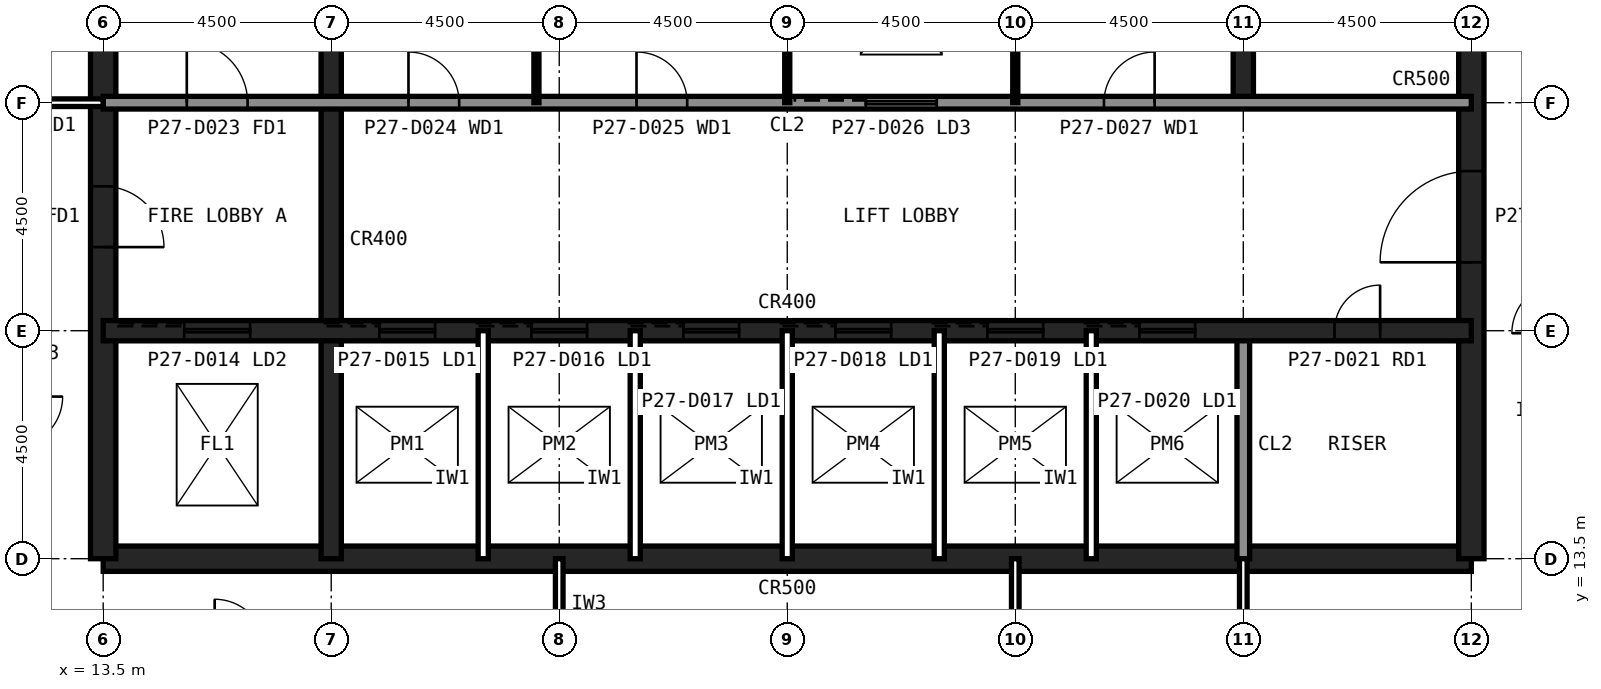
"""IFC4 building model, lengths in metres.
Left out: names, types, materials, properties, quantities, classifications, styles, units other than length and angle.
Written with IfcOpenShell. Run it as: python <this file> out.ifc"""

import sys

from ifc_helpers import new_model, si_unit, direction, frame, frame_2d, origin, place, context, subcontext, project, spatial, rectangle, extrude, element, fill, save


model = new_model("IFC4")
c1 = context("Model", 3, precision=1e-05, world=origin(), true_north=direction((0.0, 1.0)))
c2 = subcontext(c1, "Body", "Model", "MODEL_VIEW")
j1 = project(units=[si_unit("LENGTHUNIT", "METRE"), si_unit("PLANEANGLEUNIT", "RADIAN")], contexts=[c1])
p1 = place(None, origin())
s1 = spatial("IfcSite", under=j1, at=p1, CompositionType="ELEMENT")
p2 = place(p1, origin())
s2 = spatial("IfcBuilding", under=s1, at=p2, CompositionType="ELEMENT")
p3 = place(p2, frame((0.0, 0.0, 119.6)))
s3 = spatial("IfcBuildingStorey", under=s2, at=p3, CompositionType="ELEMENT", Elevation=119.6)
p4 = place(p3, frame((13.5, 13.5, 0.0), z_axis=(0.0, 0.0, 1.0), x_axis=(1.0, 0.0, 0.0)))
e1 = element("IfcWall", 1, at=p4, inside=s3, PredefinedType="SHEAR", context=c2, shape_type="SweptSolid", body=[
    extrude(rectangle(XDim=27.0, YDim=0.5, at=frame_2d((13.5, 0.0))), origin(), (0.0, 0.0, 1.0), 4.0),
])
p5 = place(p3, frame((40.5, 13.5, 0.0), z_axis=(0.0, 0.0, 1.0), x_axis=(0.0, 1.0, 0.0)))
e2 = element("IfcWall", 2, at=p5, inside=s3, PredefinedType="SHEAR", context=c2, shape_type="SweptSolid", body=[
    extrude(rectangle(XDim=27.0, YDim=0.5, at=frame_2d((13.5, 0.0))), origin(), (0.0, 0.0, 1.0), 4.0),
])
p6 = place(p5, frame((5.85, 0.0, 0.0)))
e3 = element("IfcOpeningElement", 3, at=p6, cuts=e2, PredefinedType="OPENING", context=c2, shape_type="SweptSolid", body=[
    extrude(rectangle(XDim=1.8, YDim=2.1, at=frame_2d((0.9, 1.05))), frame((0.0, 0.26, 0.0), z_axis=(0.0, -1.0, 0.0), x_axis=(1.0, 0.0, 0.0)), (0.0, 0.0, 1.0), 0.52),
])
p7 = place(p5, frame((19.65, 0.0, 0.0)))
e4 = element("IfcOpeningElement", 4, at=p7, cuts=e2, PredefinedType="OPENING", context=c2, shape_type="SweptSolid", body=[
    extrude(rectangle(XDim=1.2, YDim=2.1, at=frame_2d((0.6, 1.05))), frame((0.0, 0.26, 0.0), z_axis=(0.0, -1.0, 0.0), x_axis=(1.0, 0.0, 0.0)), (0.0, 0.0, 1.0), 0.52),
])
p8 = place(p3, frame((13.5, 40.5, 0.0), z_axis=(0.0, 0.0, 1.0), x_axis=(0.0, -1.0, 0.0)))
e5 = element("IfcWall", 5, at=p8, inside=s3, PredefinedType="SHEAR", context=c2, shape_type="SweptSolid", body=[
    extrude(rectangle(XDim=27.0, YDim=0.5, at=frame_2d((13.5, 0.0))), origin(), (0.0, 0.0, 1.0), 4.0),
])
p9 = place(p8, frame((19.65, 0.0, 0.0)))
e6 = element("IfcOpeningElement", 6, at=p9, cuts=e5, PredefinedType="OPENING", context=c2, shape_type="SweptSolid", body=[
    extrude(rectangle(XDim=1.2, YDim=2.1, at=frame_2d((0.6, 1.05))), frame((0.0, 0.26, 0.0), z_axis=(0.0, -1.0, 0.0), x_axis=(1.0, 0.0, 0.0)), (0.0, 0.0, 1.0), 0.52),
])
p10 = place(p8, frame((5.85, 0.0, 0.0)))
e7 = element("IfcOpeningElement", 7, at=p10, cuts=e5, PredefinedType="OPENING", context=c2, shape_type="SweptSolid", body=[
    extrude(rectangle(XDim=1.8, YDim=2.1, at=frame_2d((0.9, 1.05))), frame((0.0, 0.26, 0.0), z_axis=(0.0, -1.0, 0.0), x_axis=(1.0, 0.0, 0.0)), (0.0, 0.0, 1.0), 0.52),
])
p11 = place(p3, frame((18.0, 13.5, 0.0), z_axis=(0.0, 0.0, 1.0), x_axis=(0.0, 1.0, 0.0)))
e8 = element("IfcWall", 8, at=p11, inside=s3, PredefinedType="SHEAR", context=c2, shape_type="SweptSolid", body=[
    extrude(rectangle(XDim=18.0, YDim=0.4, at=frame_2d((9.0, 0.0))), origin(), (0.0, 0.0, 1.0), 4.0),
])
p12 = place(p3, frame((36.0, 13.5, 0.0), z_axis=(0.0, 0.0, 1.0), x_axis=(0.0, 1.0, 0.0)))
e9 = element("IfcWall", 9, at=p12, inside=s3, PredefinedType="SOLIDWALL", context=c2, shape_type="SweptSolid", body=[
    extrude(rectangle(XDim=4.5, YDim=0.25, at=frame_2d((2.25, 0.0))), origin(), (0.0, 0.0, 1.0), 3.84),
])
p13 = place(p3, frame((36.0, 22.5, 0.0), z_axis=(0.0, 0.0, 1.0), x_axis=(0.0, 1.0, 0.0)))
e10 = element("IfcWall", 10, at=p13, inside=s3, PredefinedType="SHEAR", context=c2, shape_type="SweptSolid", body=[
    extrude(rectangle(XDim=18.0, YDim=0.4, at=frame_2d((9.0, 0.0))), origin(), (0.0, 0.0, 1.0), 4.0),
])
p14 = place(p3, frame((13.5, 18.0, 0.0), z_axis=(0.0, 0.0, 1.0), x_axis=(1.0, 0.0, 0.0)))
e11 = element("IfcWall", 11, at=p14, inside=s3, PredefinedType="SHEAR", context=c2, shape_type="SweptSolid", body=[
    extrude(rectangle(XDim=27.0, YDim=0.4, at=frame_2d((13.5, 0.0))), origin(), (0.0, 0.0, 1.0), 4.0),
])
p15 = place(p14, frame((24.3, 0.0, 0.0)))
e12 = element("IfcOpeningElement", 12, at=p15, cuts=e11, PredefinedType="OPENING", context=c2, shape_type="SweptSolid", body=[
    extrude(rectangle(XDim=0.9, YDim=2.1, at=frame_2d((0.45, 1.05))), frame((0.0, 0.21, 0.0), z_axis=(0.0, -1.0, 0.0), x_axis=(1.0, 0.0, 0.0)), (0.0, 0.0, 1.0), 0.42),
])
p16 = place(p14, frame((5.45, 0.0, 0.0)))
e13 = element("IfcOpeningElement", 13, at=p16, cuts=e11, PredefinedType="OPENING", context=c2, shape_type="SweptSolid", body=[
    extrude(rectangle(XDim=1.1, YDim=2.1, at=frame_2d((0.55, 1.05))), frame((0.0, 0.21, 0.0), z_axis=(0.0, -1.0, 0.0), x_axis=(1.0, 0.0, 0.0)), (0.0, 0.0, 1.0), 0.42),
])
p17 = place(p14, frame((8.45, 0.0, 0.0)))
e14 = element("IfcOpeningElement", 14, at=p17, cuts=e11, PredefinedType="OPENING", context=c2, shape_type="SweptSolid", body=[
    extrude(rectangle(XDim=1.1, YDim=2.1, at=frame_2d((0.55, 1.05))), frame((0.0, 0.21, 0.0), z_axis=(0.0, -1.0, 0.0), x_axis=(1.0, 0.0, 0.0)), (0.0, 0.0, 1.0), 0.42),
])
p18 = place(p14, frame((11.45, 0.0, 0.0)))
e15 = element("IfcOpeningElement", 15, at=p18, cuts=e11, PredefinedType="OPENING", context=c2, shape_type="SweptSolid", body=[
    extrude(rectangle(XDim=1.1, YDim=2.1, at=frame_2d((0.55, 1.05))), frame((0.0, 0.21, 0.0), z_axis=(0.0, -1.0, 0.0), x_axis=(1.0, 0.0, 0.0)), (0.0, 0.0, 1.0), 0.42),
])
p19 = place(p14, frame((14.45, 0.0, 0.0)))
e16 = element("IfcOpeningElement", 16, at=p19, cuts=e11, PredefinedType="OPENING", context=c2, shape_type="SweptSolid", body=[
    extrude(rectangle(XDim=1.1, YDim=2.1, at=frame_2d((0.55, 1.05))), frame((0.0, 0.21, 0.0), z_axis=(0.0, -1.0, 0.0), x_axis=(1.0, 0.0, 0.0)), (0.0, 0.0, 1.0), 0.42),
])
p20 = place(p14, frame((17.45, 0.0, 0.0)))
e17 = element("IfcOpeningElement", 17, at=p20, cuts=e11, PredefinedType="OPENING", context=c2, shape_type="SweptSolid", body=[
    extrude(rectangle(XDim=1.1, YDim=2.1, at=frame_2d((0.55, 1.05))), frame((0.0, 0.21, 0.0), z_axis=(0.0, -1.0, 0.0), x_axis=(1.0, 0.0, 0.0)), (0.0, 0.0, 1.0), 0.42),
])
p21 = place(p14, frame((20.45, 0.0, 0.0)))
e18 = element("IfcOpeningElement", 18, at=p21, cuts=e11, PredefinedType="OPENING", context=c2, shape_type="SweptSolid", body=[
    extrude(rectangle(XDim=1.1, YDim=2.1, at=frame_2d((0.55, 1.05))), frame((0.0, 0.21, 0.0), z_axis=(0.0, -1.0, 0.0), x_axis=(1.0, 0.0, 0.0)), (0.0, 0.0, 1.0), 0.42),
])
p22 = place(p14, frame((1.6, 0.0, 0.0)))
e19 = element("IfcOpeningElement", 19, at=p22, cuts=e11, PredefinedType="OPENING", context=c2, shape_type="SweptSolid", body=[
    extrude(rectangle(XDim=1.3, YDim=2.2, at=frame_2d((0.65, 1.1))), frame((0.0, 0.21, 0.0), z_axis=(0.0, -1.0, 0.0), x_axis=(1.0, 0.0, 0.0)), (0.0, 0.0, 1.0), 0.42),
])
p23 = place(p3, frame((13.5, 22.5, 0.0), z_axis=(0.0, 0.0, 1.0), x_axis=(1.0, 0.0, 0.0)))
e20 = element("IfcWall", 20, at=p23, inside=s3, PredefinedType="SOLIDWALL", context=c2, shape_type="SweptSolid", body=[
    extrude(rectangle(XDim=27.0, YDim=0.25, at=frame_2d((13.5, 0.0))), origin(), (0.0, 0.0, 1.0), 3.84),
])
p24 = place(p23, frame((1.65, 0.0, 0.0)))
e21 = element("IfcOpeningElement", 21, at=p24, cuts=e20, PredefinedType="OPENING", context=c2, shape_type="SweptSolid", body=[
    extrude(rectangle(XDim=1.2, YDim=2.1, at=frame_2d((0.6, 1.05))), frame((0.0, 0.135, 0.0), z_axis=(0.0, -1.0, 0.0), x_axis=(1.0, 0.0, 0.0)), (0.0, 0.0, 1.0), 0.27),
])
p25 = place(p23, frame((6.025, 0.0, 0.0)))
e22 = element("IfcOpeningElement", 22, at=p25, cuts=e20, PredefinedType="OPENING", context=c2, shape_type="SweptSolid", body=[
    extrude(rectangle(XDim=1.0, YDim=2.1, at=frame_2d((0.5, 1.05))), frame((0.0, 0.135, 0.0), z_axis=(0.0, -1.0, 0.0), x_axis=(1.0, 0.0, 0.0)), (0.0, 0.0, 1.0), 0.27),
])
p26 = place(p23, frame((10.525, 0.0, 0.0)))
e23 = element("IfcOpeningElement", 23, at=p26, cuts=e20, PredefinedType="OPENING", context=c2, shape_type="SweptSolid", body=[
    extrude(rectangle(XDim=1.0, YDim=2.1, at=frame_2d((0.5, 1.05))), frame((0.0, 0.135, 0.0), z_axis=(0.0, -1.0, 0.0), x_axis=(1.0, 0.0, 0.0)), (0.0, 0.0, 1.0), 0.27),
])
p27 = place(p23, frame((19.75, 0.0, 0.0)))
e24 = element("IfcOpeningElement", 24, at=p27, cuts=e20, PredefinedType="OPENING", context=c2, shape_type="SweptSolid", body=[
    extrude(rectangle(XDim=1.0, YDim=2.1, at=frame_2d((0.5, 1.05))), frame((0.0, 0.135, 0.0), z_axis=(0.0, -1.0, 0.0), x_axis=(1.0, 0.0, 0.0)), (0.0, 0.0, 1.0), 0.27),
])
p28 = place(p23, frame((15.05, 0.0, 0.0)))
e25 = element("IfcOpeningElement", 25, at=p28, cuts=e20, PredefinedType="OPENING", context=c2, shape_type="SweptSolid", body=[
    extrude(rectangle(XDim=1.4, YDim=2.4, at=frame_2d((0.7, 1.2))), frame((0.0, 0.135, 0.0), z_axis=(0.0, -1.0, 0.0), x_axis=(1.0, 0.0, 0.0)), (0.0, 0.0, 1.0), 0.27),
])
for number, where, z_axis, x_axis in (
    (26, (21.0, 13.5, 0.0), (0.0, 0.0, 1.0), (0.0, 1.0, 0.0)),
    (27, (24.0, 13.5, 0.0), (0.0, 0.0, 1.0), (0.0, 1.0, 0.0)),
    (28, (27.0, 13.5, 0.0), (0.0, 0.0, 1.0), (0.0, 1.0, 0.0)),
    (29, (30.0, 13.5, 0.0), (0.0, 0.0, 1.0), (0.0, 1.0, 0.0)),
    (30, (33.0, 13.5, 0.0), (0.0, 0.0, 1.0), (0.0, 1.0, 0.0)),
):
    element("IfcWall", number, at=place(p3, frame(where, z_axis=z_axis, x_axis=x_axis)), inside=s3, PredefinedType="PARTITIONING", context=c2, shape_type="SweptSolid", body=[
        extrude(rectangle(XDim=4.5, YDim=0.2, at=frame_2d((2.25, 0.0))), origin(), (0.0, 0.0, 1.0), 3.84),
    ])
for number, where, z_axis, x_axis in (
    (31, (22.05, 22.5, 0.0), (0.0, 0.0, 1.0), (0.0, 1.0, 0.0)),
    (32, (27.0, 22.5, 0.0), (0.0, 0.0, 1.0), (0.0, 1.0, 0.0)),
    (33, (31.5, 22.5, 0.0), (0.0, 0.0, 1.0), (0.0, 1.0, 0.0)),
):
    element("IfcWall", number, at=place(p3, frame(where, z_axis=z_axis, x_axis=x_axis)), inside=s3, PredefinedType="PLUMBINGWALL", context=c2, shape_type="SweptSolid", body=[
        extrude(rectangle(XDim=9.0, YDim=0.1, at=frame_2d((4.5, 0.0))), origin(), (0.0, 0.0, 1.0), 3.84),
    ])
p29 = place(p3, frame((31.5, 9.0, 0.0), z_axis=(0.0, 0.0, 1.0), x_axis=(0.0, 1.0, 0.0)))
e34 = element("IfcWall", 34, at=p29, inside=s3, PredefinedType="PARTITIONING", context=c2, shape_type="SweptSolid", body=[
    extrude(rectangle(XDim=4.5, YDim=0.15, at=frame_2d((2.25, 0.0))), origin(), (0.0, 0.0, 1.0), 2.989),
])
p30 = place(p3, frame((22.5, 13.5, 0.0), z_axis=(0.0, 0.0, 1.0), x_axis=(0.0, -1.0, 0.0)))
e35 = element("IfcWall", 35, at=p30, inside=s3, PredefinedType="PARTITIONING", context=c2, shape_type="SweptSolid", body=[
    extrude(rectangle(XDim=4.5, YDim=0.15, at=frame_2d((2.25, 0.0))), origin(), (0.0, 0.0, 1.0), 2.989),
])
p31 = place(p30, frame((1.75, 0.0, 0.0)))
e36 = element("IfcOpeningElement", 36, at=p31, cuts=e35, PredefinedType="OPENING", context=c2, shape_type="SweptSolid", body=[
    extrude(rectangle(XDim=1.0, YDim=2.1, at=frame_2d((0.5, 1.05))), frame((0.0, 0.085, 0.0), z_axis=(0.0, -1.0, 0.0), x_axis=(1.0, 0.0, 0.0)), (0.0, 0.0, 1.0), 0.17),
])
p32 = place(p3, frame((9.9, 22.5, 0.0), z_axis=(0.0, 0.0, 1.0), x_axis=(1.0, 0.0, 0.0)))
e37 = element("IfcWall", 37, at=p32, inside=s3, PredefinedType="PARTITIONING", context=c2, shape_type="SweptSolid", body=[
    extrude(rectangle(XDim=3.6, YDim=0.15, at=frame_2d((1.8, 0.0))), origin(), (0.0, 0.0, 1.0), 2.989),
])
p33 = place(p32, frame((1.3, 0.0, 0.0)))
e38 = element("IfcOpeningElement", 38, at=p33, cuts=e37, PredefinedType="OPENING", context=c2, shape_type="SweptSolid", body=[
    extrude(rectangle(XDim=1.0, YDim=2.1, at=frame_2d((0.5, 1.05))), frame((0.0, 0.085, 0.0), z_axis=(0.0, -1.0, 0.0), x_axis=(1.0, 0.0, 0.0)), (0.0, 0.0, 1.0), 0.17),
])
p34 = place(p3, frame((36.0, 9.0, 0.0), z_axis=(0.0, 0.0, 1.0), x_axis=(0.0, 1.0, 0.0)))
e39 = element("IfcWall", 39, at=p34, inside=s3, PredefinedType="PARTITIONING", context=c2, shape_type="SweptSolid", body=[
    extrude(rectangle(XDim=4.5, YDim=0.15, at=frame_2d((2.25, 0.0))), origin(), (0.0, 0.0, 1.0), 2.989),
])
p35 = place(p34, frame((1.75, 0.0, 0.0)))
e40 = element("IfcOpeningElement", 40, at=p35, cuts=e39, PredefinedType="OPENING", context=c2, shape_type="SweptSolid", body=[
    extrude(rectangle(XDim=1.0, YDim=2.1, at=frame_2d((0.5, 1.05))), frame((0.0, 0.085, 0.0), z_axis=(0.0, -1.0, 0.0), x_axis=(1.0, 0.0, 0.0)), (0.0, 0.0, 1.0), 0.17),
])
p36 = place(p9, origin())
e41 = element("IfcDoor", 41, at=p36, inside=s3, OperationType="SINGLE_SWING_RIGHT", PredefinedType="DOOR", context=c2, shape_type="SweptSolid", body=[
    extrude(rectangle(XDim=1.2, YDim=2.1, at=frame_2d((0.6, 1.05))), frame((0.0, 0.025, 0.0), z_axis=(0.0, -1.0, 0.0), x_axis=(1.0, 0.0, 0.0)), (0.0, 0.0, 1.0), 0.05),
])
fill(e6, e41)
p37 = place(p6, origin())
e42 = element("IfcDoor", 42, at=p37, inside=s3, OperationType="SINGLE_SWING_LEFT", PredefinedType="DOOR", context=c2, shape_type="SweptSolid", body=[
    extrude(rectangle(XDim=1.8, YDim=2.1, at=frame_2d((0.9, 1.05))), frame((0.0, 0.025, 0.0), z_axis=(0.0, -1.0, 0.0), x_axis=(1.0, 0.0, 0.0)), (0.0, 0.0, 1.0), 0.05),
])
fill(e3, e42)
p38 = place(p24, origin())
e43 = element("IfcDoor", 43, at=p38, inside=s3, OperationType="SINGLE_SWING_LEFT", PredefinedType="DOOR", context=c2, shape_type="SweptSolid", body=[
    extrude(rectangle(XDim=1.2, YDim=2.1, at=frame_2d((0.6, 1.05))), frame((0.0, 0.025, 0.0), z_axis=(0.0, -1.0, 0.0), x_axis=(1.0, 0.0, 0.0)), (0.0, 0.0, 1.0), 0.05),
])
fill(e21, e43)
p39 = place(p25, origin())
e44 = element("IfcDoor", 44, at=p39, inside=s3, OperationType="SINGLE_SWING_LEFT", PredefinedType="DOOR", context=c2, shape_type="SweptSolid", body=[
    extrude(rectangle(XDim=1.0, YDim=2.1, at=frame_2d((0.5, 1.05))), frame((0.0, 0.025, 0.0), z_axis=(0.0, -1.0, 0.0), x_axis=(1.0, 0.0, 0.0)), (0.0, 0.0, 1.0), 0.05),
])
fill(e22, e44)
p40 = place(p26, origin())
e45 = element("IfcDoor", 45, at=p40, inside=s3, OperationType="SINGLE_SWING_LEFT", PredefinedType="DOOR", context=c2, shape_type="SweptSolid", body=[
    extrude(rectangle(XDim=1.0, YDim=2.1, at=frame_2d((0.5, 1.05))), frame((0.0, 0.025, 0.0), z_axis=(0.0, -1.0, 0.0), x_axis=(1.0, 0.0, 0.0)), (0.0, 0.0, 1.0), 0.05),
])
fill(e23, e45)
p41 = place(p27, origin())
e46 = element("IfcDoor", 46, at=p41, inside=s3, OperationType="SINGLE_SWING_RIGHT", PredefinedType="DOOR", context=c2, shape_type="SweptSolid", body=[
    extrude(rectangle(XDim=1.0, YDim=2.1, at=frame_2d((0.5, 1.05))), frame((0.0, 0.025, 0.0), z_axis=(0.0, -1.0, 0.0), x_axis=(1.0, 0.0, 0.0)), (0.0, 0.0, 1.0), 0.05),
])
fill(e24, e46)
p42 = place(p15, origin())
e47 = element("IfcDoor", 47, at=p42, inside=s3, OperationType="SINGLE_SWING_RIGHT", PredefinedType="DOOR", context=c2, shape_type="SweptSolid", body=[
    extrude(rectangle(XDim=0.9, YDim=2.1, at=frame_2d((0.45, 1.05))), frame((0.0, 0.025, 0.0), z_axis=(0.0, -1.0, 0.0), x_axis=(1.0, 0.0, 0.0)), (0.0, 0.0, 1.0), 0.05),
])
fill(e12, e47)
p43 = place(p16, origin())
e48 = element("IfcDoor", 48, at=p43, inside=s3, OperationType="SLIDING_TO_LEFT", PredefinedType="DOOR", context=c2, shape_type="SweptSolid", body=[
    extrude(rectangle(XDim=1.1, YDim=2.1, at=frame_2d((0.55, 1.05))), frame((0.0, 0.025, 0.0), z_axis=(0.0, -1.0, 0.0), x_axis=(1.0, 0.0, 0.0)), (0.0, 0.0, 1.0), 0.05),
])
fill(e13, e48)
p44 = place(p17, origin())
e49 = element("IfcDoor", 49, at=p44, inside=s3, OperationType="SLIDING_TO_LEFT", PredefinedType="DOOR", context=c2, shape_type="SweptSolid", body=[
    extrude(rectangle(XDim=1.1, YDim=2.1, at=frame_2d((0.55, 1.05))), frame((0.0, 0.025, 0.0), z_axis=(0.0, -1.0, 0.0), x_axis=(1.0, 0.0, 0.0)), (0.0, 0.0, 1.0), 0.05),
])
fill(e14, e49)
p45 = place(p18, origin())
e50 = element("IfcDoor", 50, at=p45, inside=s3, OperationType="SLIDING_TO_LEFT", PredefinedType="DOOR", context=c2, shape_type="SweptSolid", body=[
    extrude(rectangle(XDim=1.1, YDim=2.1, at=frame_2d((0.55, 1.05))), frame((0.0, 0.025, 0.0), z_axis=(0.0, -1.0, 0.0), x_axis=(1.0, 0.0, 0.0)), (0.0, 0.0, 1.0), 0.05),
])
fill(e15, e50)
p46 = place(p19, origin())
e51 = element("IfcDoor", 51, at=p46, inside=s3, OperationType="SLIDING_TO_LEFT", PredefinedType="DOOR", context=c2, shape_type="SweptSolid", body=[
    extrude(rectangle(XDim=1.1, YDim=2.1, at=frame_2d((0.55, 1.05))), frame((0.0, 0.025, 0.0), z_axis=(0.0, -1.0, 0.0), x_axis=(1.0, 0.0, 0.0)), (0.0, 0.0, 1.0), 0.05),
])
fill(e16, e51)
p47 = place(p20, origin())
e52 = element("IfcDoor", 52, at=p47, inside=s3, OperationType="SLIDING_TO_LEFT", PredefinedType="DOOR", context=c2, shape_type="SweptSolid", body=[
    extrude(rectangle(XDim=1.1, YDim=2.1, at=frame_2d((0.55, 1.05))), frame((0.0, 0.025, 0.0), z_axis=(0.0, -1.0, 0.0), x_axis=(1.0, 0.0, 0.0)), (0.0, 0.0, 1.0), 0.05),
])
fill(e17, e52)
p48 = place(p21, origin())
e53 = element("IfcDoor", 53, at=p48, inside=s3, OperationType="SLIDING_TO_LEFT", PredefinedType="DOOR", context=c2, shape_type="SweptSolid", body=[
    extrude(rectangle(XDim=1.1, YDim=2.1, at=frame_2d((0.55, 1.05))), frame((0.0, 0.025, 0.0), z_axis=(0.0, -1.0, 0.0), x_axis=(1.0, 0.0, 0.0)), (0.0, 0.0, 1.0), 0.05),
])
fill(e18, e53)
p49 = place(p22, origin())
e54 = element("IfcDoor", 54, at=p49, inside=s3, OperationType="SLIDING_TO_LEFT", PredefinedType="DOOR", context=c2, shape_type="SweptSolid", body=[
    extrude(rectangle(XDim=1.3, YDim=2.2, at=frame_2d((0.65, 1.1))), frame((0.0, 0.025, 0.0), z_axis=(0.0, -1.0, 0.0), x_axis=(1.0, 0.0, 0.0)), (0.0, 0.0, 1.0), 0.05),
])
fill(e19, e54)
p50 = place(p28, origin())
e55 = element("IfcDoor", 55, at=p50, inside=s3, OperationType="SLIDING_TO_LEFT", PredefinedType="DOOR", context=c2, shape_type="SweptSolid", body=[
    extrude(rectangle(XDim=1.4, YDim=2.4, at=frame_2d((0.7, 1.2))), frame((0.0, 0.025, 0.0), z_axis=(0.0, -1.0, 0.0), x_axis=(1.0, 0.0, 0.0)), (0.0, 0.0, 1.0), 0.05),
])
fill(e25, e55)
save(model, sys.argv[1])
